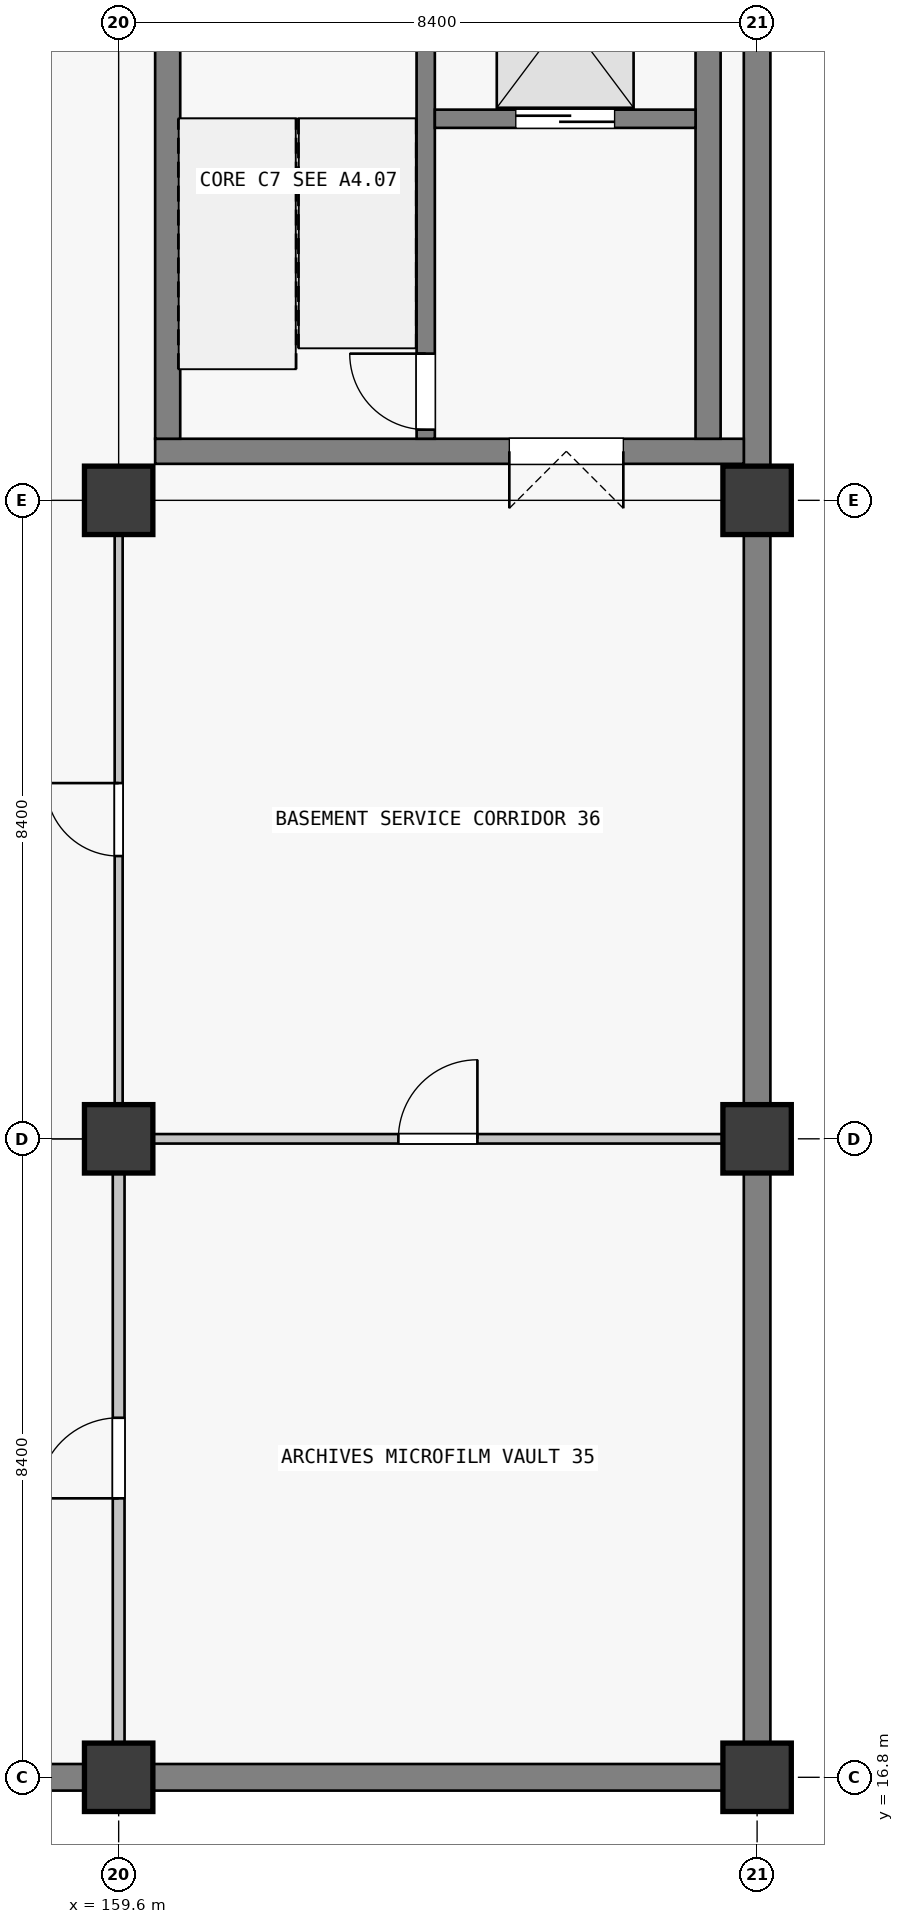
"""IFC4 building model, lengths in metres.
Left out: names, types, materials, properties, quantities, classifications, styles, units other than length and angle.
Written with IfcOpenShell. Run it as: python <this file> out.ifc"""

import sys

from ifc_helpers import new_model, si_unit, direction, frame, frame_2d, origin, origin_2d, place, context, subcontext, project, spatial, rectangle, extrude, element, fill, save


model = new_model("IFC4")
c1 = context("Model", 3, precision=1e-05, world=origin(), true_north=direction((0.0, 1.0)))
c2 = subcontext(c1, "Body", "Model", "MODEL_VIEW")
j1 = project(units=[si_unit("LENGTHUNIT", "METRE"), si_unit("PLANEANGLEUNIT", "RADIAN")], contexts=[c1])
p1 = place(None, origin())
s1 = spatial("IfcSite", under=j1, at=p1, CompositionType="ELEMENT")
p2 = place(p1, origin())
s2 = spatial("IfcBuilding", under=s1, at=p2, CompositionType="ELEMENT")
p3 = place(p2, frame((0.0, 0.0, -4.5)))
s3 = spatial("IfcBuildingStorey", under=s2, at=p3, CompositionType="ELEMENT", Elevation=-4.5)
for number, where, z_axis, x_axis in (
    (1, (159.6, 16.8, -0.35), (0.0, 0.0, 1.0), (1.0, 0.0, 0.0)),
    (2, (159.6, 25.2, -0.35), (0.0, 0.0, 1.0), (1.0, 0.0, 0.0)),
    (3, (159.6, 33.6, -0.35), (0.0, 0.0, 1.0), (1.0, 0.0, 0.0)),
    (4, (168.0, 16.8, -0.35), (0.0, 0.0, 1.0), (1.0, 0.0, 0.0)),
    (5, (168.0, 25.2, -0.35), (0.0, 0.0, 1.0), (1.0, 0.0, 0.0)),
    (6, (168.0, 33.6, -0.35), (0.0, 0.0, 1.0), (1.0, 0.0, 0.0)),
):
    element("IfcColumn", number, at=place(p3, frame(where, z_axis=z_axis, x_axis=x_axis)), inside=s3, PredefinedType="COLUMN", context=c2, shape_type="SweptSolid", body=[
        extrude(rectangle(XDim=0.9, YDim=0.9, at=origin_2d()), origin(), (0.0, 0.0, 1.0), 4.85),
    ])
for number, where, z_axis, x_axis in (
    (7, (159.149, 16.8, 0.0), (0.0, 0.0, 1.0), (-1.0, 0.0, 0.0)),
    (8, (167.549, 16.8, 0.0), (0.0, 0.0, 1.0), (-1.0, 0.0, 0.0)),
    (9, (168.0, 24.749, 0.0), (0.0, 0.0, 1.0), (0.0, -1.0, 0.0)),
    (10, (168.0, 33.149, 0.0), (0.0, 0.0, 1.0), (0.0, -1.0, 0.0)),
    (11, (168.0, 41.549, 0.0), (0.0, 0.0, 1.0), (0.0, -1.0, 0.0)),
):
    element("IfcWall", number, at=place(p3, frame(where, z_axis=z_axis, x_axis=x_axis)), inside=s3, PredefinedType="SOLIDWALL", context=c2, shape_type="SweptSolid", body=[
        extrude(rectangle(XDim=7.498, YDim=0.35, at=frame_2d((3.749, 0.0))), origin(), (0.0, 0.0, 1.0), 3.35),
    ])
p4 = place(p3, frame((167.825, 34.245, -0.35), z_axis=(0.0, 0.0, 1.0), x_axis=(-1.0, 0.0, 0.0)))
e12 = element("IfcWall", 12, at=p4, inside=s3, PredefinedType="SHEAR", context=c2, shape_type="SweptSolid", body=[
    extrude(rectangle(XDim=7.745, YDim=0.33, at=frame_2d((3.873, 0.0))), origin(), (0.0, 0.0, 1.0), 4.85),
])
p5 = place(p4, frame((1.585, 0.0, 0.35)))
e13 = element("IfcOpeningElement", 13, at=p5, cuts=e12, PredefinedType="OPENING", context=c2, shape_type="SweptSolid", body=[
    extrude(rectangle(XDim=1.5, YDim=2.15, at=frame_2d((0.75, 1.075))), frame((0.0, 0.165, 0.0), z_axis=(0.0, -1.0, 0.0), x_axis=(1.0, 0.0, 0.0)), (0.0, 0.0, 1.0), 0.33),
])
for number, where, z_axis, x_axis in (
    (14, (160.245, 34.41, -0.35), (0.0, 0.0, 1.0), (0.0, 1.0, 0.0)),
    (15, (167.355, 41.19, -0.35), (0.0, 0.0, 1.0), (0.0, -1.0, 0.0)),
):
    element("IfcWall", number, at=place(p3, frame(where, z_axis=z_axis, x_axis=x_axis)), inside=s3, PredefinedType="SHEAR", context=c2, shape_type="SweptSolid", body=[
        extrude(rectangle(XDim=6.78, YDim=0.33, at=frame_2d((3.39, 0.0))), origin(), (0.0, 0.0, 1.0), 4.85),
    ])
p6 = place(p3, frame((163.64, 34.41, -0.35), z_axis=(0.0, 0.0, 1.0), x_axis=(0.0, 1.0, 0.0)))
e16 = element("IfcWall", 16, at=p6, inside=s3, PredefinedType="SHEAR", context=c2, shape_type="SweptSolid", body=[
    extrude(rectangle(XDim=6.78, YDim=0.24, at=frame_2d((3.39, 0.0))), origin(), (0.0, 0.0, 1.0), 4.85),
])
p7 = place(p6, frame((0.12, 0.0, 0.35)))
e17 = element("IfcOpeningElement", 17, at=p7, cuts=e16, PredefinedType="OPENING", context=c2, shape_type="SweptSolid", body=[
    extrude(rectangle(XDim=1.0, YDim=2.15, at=frame_2d((0.5, 1.075))), frame((0.0, 0.12, 0.0), z_axis=(0.0, -1.0, 0.0), x_axis=(1.0, 0.0, 0.0)), (0.0, 0.0, 1.0), 0.24),
])
p8 = place(p3, frame((163.76, 38.62, -0.35), z_axis=(0.0, 0.0, 1.0), x_axis=(1.0, 0.0, 0.0)))
e18 = element("IfcWall", 18, at=p8, inside=s3, PredefinedType="SHEAR", context=c2, shape_type="SweptSolid", body=[
    extrude(rectangle(XDim=3.43, YDim=0.24, at=frame_2d((1.715, 0.0))), origin(), (0.0, 0.0, 1.0), 4.85),
])
p9 = place(p8, frame((1.065, 0.0, 0.35)))
e19 = element("IfcOpeningElement", 19, at=p9, cuts=e18, PredefinedType="OPENING", context=c2, shape_type="SweptSolid", body=[
    extrude(rectangle(XDim=1.3, YDim=2.25, at=frame_2d((0.65, 1.125))), frame((0.0, 0.12, 0.0), z_axis=(0.0, -1.0, 0.0), x_axis=(1.0, 0.0, 0.0)), (0.0, 0.0, 1.0), 0.24),
])
p10 = place(p3, frame((160.052, 25.2, 0.0), z_axis=(0.0, 0.0, 1.0), x_axis=(1.0, 0.0, 0.0)))
e20 = element("IfcWall", 20, at=p10, inside=s3, PredefinedType="PARTITIONING", context=c2, shape_type="SweptSolid", body=[
    extrude(rectangle(XDim=7.496, YDim=0.125, at=frame_2d((3.748, 0.0))), origin(), (0.0, 0.0, 1.0), 3.27),
])
p11 = place(p10, frame((3.228, 0.0, 0.0)))
e21 = element("IfcOpeningElement", 21, at=p11, cuts=e20, PredefinedType="OPENING", context=c2, shape_type="SweptSolid", body=[
    extrude(rectangle(XDim=1.04, YDim=2.2, at=frame_2d((0.52, 1.1))), frame((0.0, 0.062, 0.0), z_axis=(0.0, -1.0, 0.0), x_axis=(1.0, 0.0, 0.0)), (0.0, 0.0, 1.0), 0.125),
])
p12 = place(p3, frame((159.6, 17.252, 0.0), z_axis=(0.0, 0.0, 1.0), x_axis=(0.0, 1.0, 0.0)))
e22 = element("IfcWall", 22, at=p12, inside=s3, PredefinedType="PARTITIONING", context=c2, shape_type="SweptSolid", body=[
    extrude(rectangle(XDim=7.496, YDim=0.155, at=frame_2d((3.748, 0.0))), origin(), (0.0, 0.0, 1.0), 3.27),
])
p13 = place(p12, frame((3.218, 0.0, 0.0)))
e23 = element("IfcOpeningElement", 23, at=p13, cuts=e22, PredefinedType="OPENING", context=c2, shape_type="SweptSolid", body=[
    extrude(rectangle(XDim=1.06, YDim=2.25, at=frame_2d((0.53, 1.125))), frame((0.0, 0.078, 0.0), z_axis=(0.0, -1.0, 0.0), x_axis=(1.0, 0.0, 0.0)), (0.0, 0.0, 1.0), 0.155),
])
p14 = place(p3, frame((159.6, 25.652, 0.0), z_axis=(0.0, 0.0, 1.0), x_axis=(0.0, 1.0, 0.0)))
e24 = element("IfcWall", 24, at=p14, inside=s3, PredefinedType="PARTITIONING", context=c2, shape_type="SweptSolid", body=[
    extrude(rectangle(XDim=7.496, YDim=0.105, at=frame_2d((3.748, 0.0))), origin(), (0.0, 0.0, 1.0), 3.27),
])
p15 = place(p14, frame((3.268, 0.0, 0.0)))
e25 = element("IfcOpeningElement", 25, at=p15, cuts=e24, PredefinedType="OPENING", context=c2, shape_type="SweptSolid", body=[
    extrude(rectangle(XDim=0.96, YDim=2.18, at=frame_2d((0.48, 1.09))), frame((0.0, 0.052, 0.0), z_axis=(0.0, -1.0, 0.0), x_axis=(1.0, 0.0, 0.0)), (0.0, 0.0, 1.0), 0.105),
])
p16 = place(p7, origin())
e26 = element("IfcDoor", 26, at=p16, inside=s3, OperationType="SINGLE_SWING_RIGHT", PredefinedType="DOOR", context=c2, shape_type="SweptSolid", body=[
    extrude(rectangle(XDim=1.0, YDim=2.15, at=frame_2d((0.5, 1.075))), frame((0.0, 0.025, 0.0), z_axis=(0.0, -1.0, 0.0), x_axis=(1.0, 0.0, 0.0)), (0.0, 0.0, 1.0), 0.05),
])
fill(e17, e26)
p17 = place(p5, origin())
e27 = element("IfcDoor", 27, at=p17, inside=s3, OperationType="DOUBLE_DOOR_SINGLE_SWING", PredefinedType="DOOR", context=c2, shape_type="SweptSolid", body=[
    extrude(rectangle(XDim=1.5, YDim=2.15, at=frame_2d((0.75, 1.075))), frame((0.0, 0.025, 0.0), z_axis=(0.0, -1.0, 0.0), x_axis=(1.0, 0.0, 0.0)), (0.0, 0.0, 1.0), 0.05),
])
fill(e13, e27)
p18 = place(p9, origin())
e28 = element("IfcDoor", 28, at=p18, inside=s3, OperationType="DOUBLE_DOOR_SLIDING", PredefinedType="DOOR", context=c2, shape_type="SweptSolid", body=[
    extrude(rectangle(XDim=1.3, YDim=2.25, at=frame_2d((0.65, 1.125))), frame((0.0, 0.025, 0.0), z_axis=(0.0, -1.0, 0.0), x_axis=(1.0, 0.0, 0.0)), (0.0, 0.0, 1.0), 0.05),
])
fill(e19, e28)
p19 = place(p11, origin())
e29 = element("IfcDoor", 29, at=p19, inside=s3, OperationType="SINGLE_SWING_RIGHT", PredefinedType="DOOR", context=c2, shape_type="SweptSolid", body=[
    extrude(rectangle(XDim=1.04, YDim=2.2, at=frame_2d((0.52, 1.1))), frame((0.0, 0.025, 0.0), z_axis=(0.0, -1.0, 0.0), x_axis=(1.0, 0.0, 0.0)), (0.0, 0.0, 1.0), 0.05),
])
fill(e21, e29)
p20 = place(p15, origin())
e30 = element("IfcDoor", 30, at=p20, inside=s3, OperationType="SINGLE_SWING_RIGHT", PredefinedType="DOOR", context=c2, shape_type="SweptSolid", body=[
    extrude(rectangle(XDim=0.96, YDim=2.18, at=frame_2d((0.48, 1.09))), frame((0.0, 0.025, 0.0), z_axis=(0.0, -1.0, 0.0), x_axis=(1.0, 0.0, 0.0)), (0.0, 0.0, 1.0), 0.05),
])
fill(e25, e30)
p21 = place(p13, origin())
e31 = element("IfcDoor", 31, at=p21, inside=s3, OperationType="SINGLE_SWING_LEFT", PredefinedType="DOOR", context=c2, shape_type="SweptSolid", body=[
    extrude(rectangle(XDim=1.06, YDim=2.25, at=frame_2d((0.53, 1.125))), frame((0.0, 0.025, 0.0), z_axis=(0.0, -1.0, 0.0), x_axis=(1.0, 0.0, 0.0)), (0.0, 0.0, 1.0), 0.05),
])
fill(e23, e31)
save(model, sys.argv[1])
